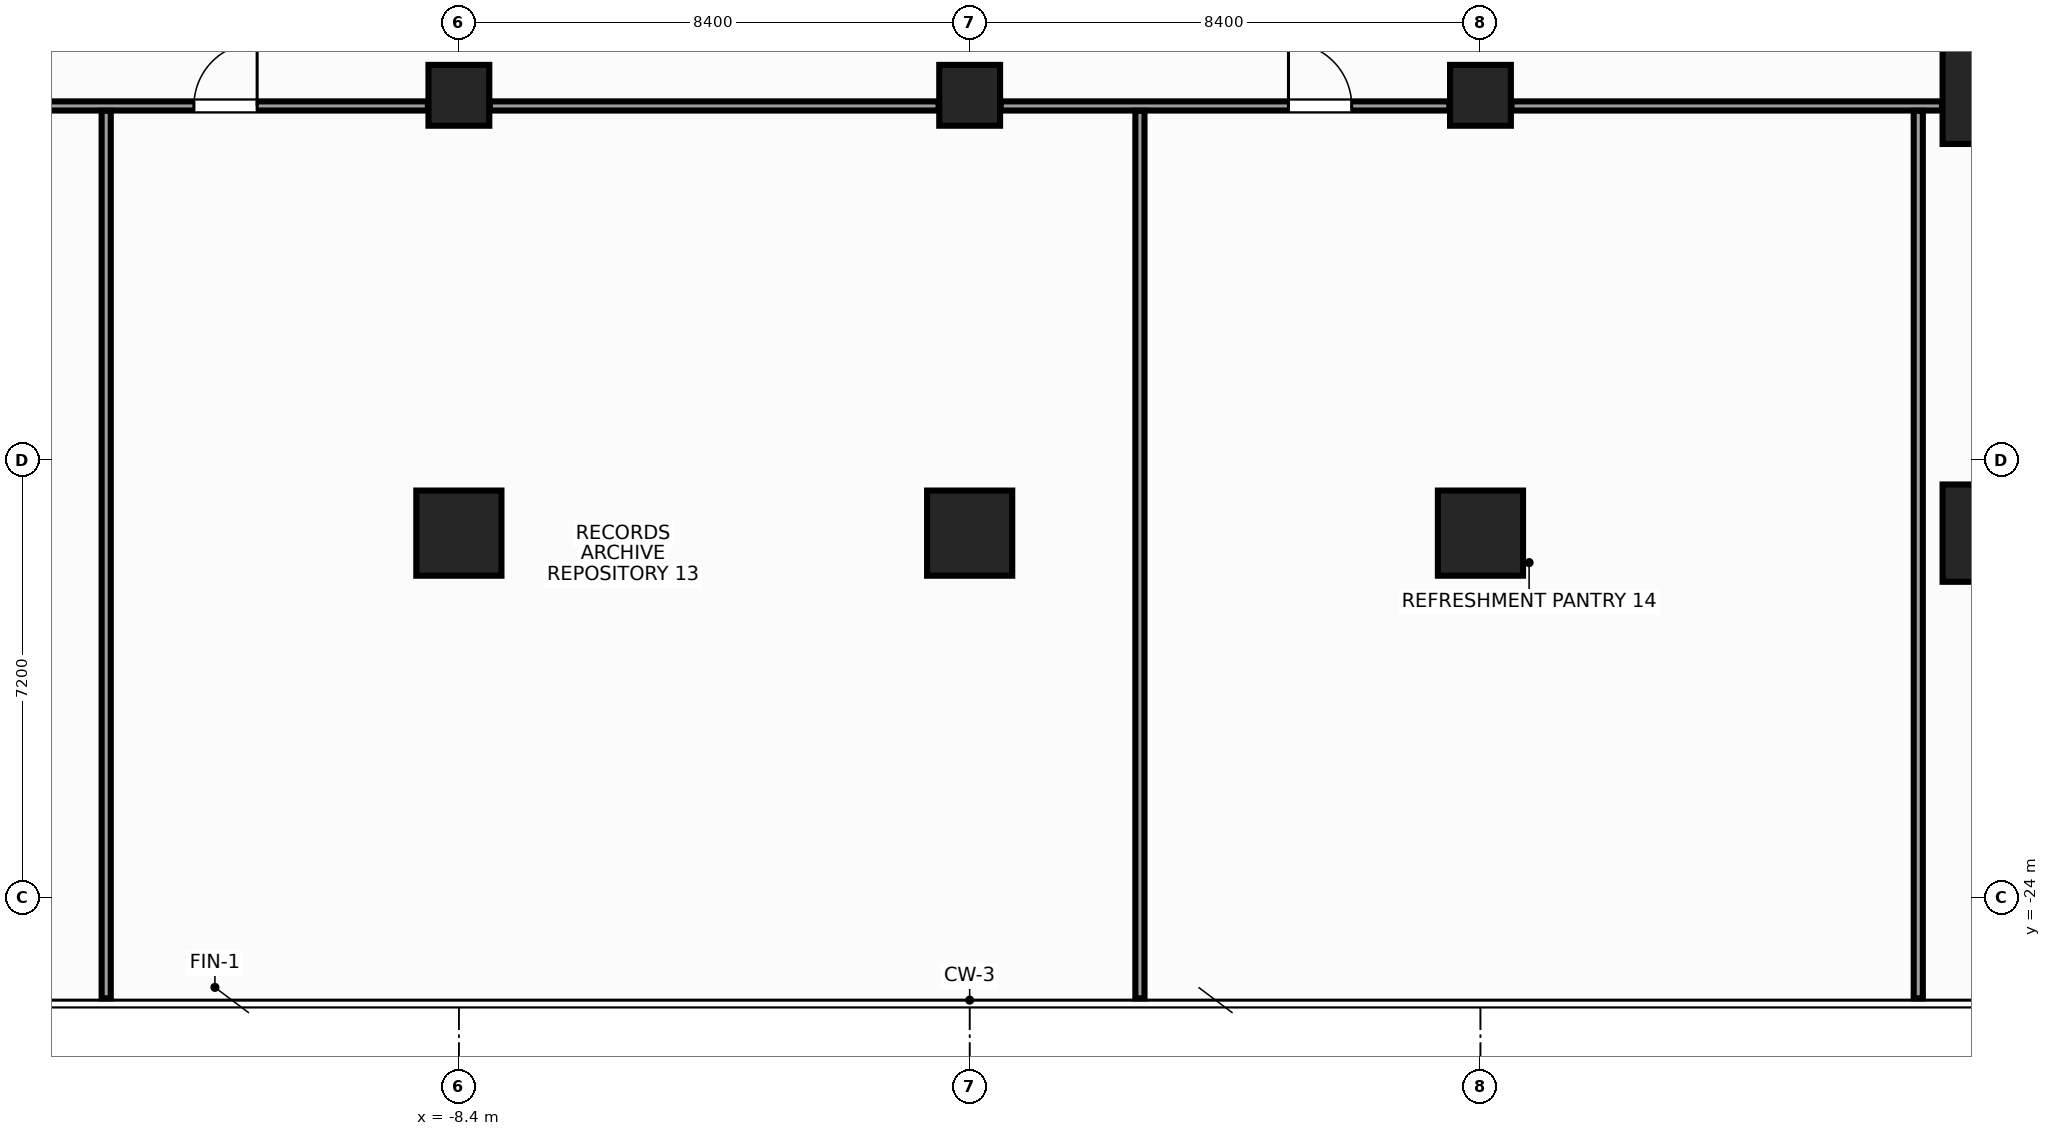
"""IFC4 building model, lengths in metres.
Left out: names, types, materials, properties, quantities, classifications, styles, units other than length and angle.
Written with IfcOpenShell. Run it as: python <this file> out.ifc"""

import sys

from ifc_helpers import new_model, si_unit, direction, frame, frame_2d, origin, origin_2d, place, context, subcontext, project, spatial, rectangle, hollow_rectangle, extrude, source, transform, mapped, element, fill, save


model = new_model("IFC4")
c1 = context("Model", 3, precision=1e-05, world=origin(), true_north=direction((0.0, 1.0)))
c2 = subcontext(c1, "Body", "Model", "MODEL_VIEW")
j1 = project(units=[si_unit("LENGTHUNIT", "METRE"), si_unit("PLANEANGLEUNIT", "RADIAN")], contexts=[c1])
p1 = place(None, origin())
s1 = spatial("IfcSite", under=j1, at=p1, CompositionType="ELEMENT")
p2 = place(p1, origin())
s2 = spatial("IfcBuilding", under=s1, at=p2, CompositionType="ELEMENT")
p3 = place(p2, frame((0.0, 0.0, 92.0)))
s3 = spatial("IfcBuildingStorey", under=s2, at=p3, CompositionType="ELEMENT", Elevation=92.0)
m1 = source(origin(), c2, "Body", "SweptSolid", [
    extrude(rectangle(XDim=1.6, YDim=1.6, at=origin_2d()), origin(), (0.0, 0.0, 1.0), 3.6),
])
for number, where, z_axis, x_axis in (
    (1, (16.8, -18.0, 0.0), (0.0, 0.0, 1.0), (1.0, 0.0, 0.0)),
    (2, (16.8, -10.8, 0.0), (0.0, 0.0, 1.0), (1.0, 0.0, 0.0)),
):
    element("IfcColumn", number, at=place(p3, frame(where, z_axis=z_axis, x_axis=x_axis)), inside=s3, PredefinedType="COLUMN", context=c2, shape_type="MappedRepresentation", body=[
        mapped(m1, transform((0.0, 0.0, 0.0), x_axis=(1.0, 0.0, 0.0), y_axis=(0.0, 1.0, 0.0), z_axis=(0.0, 0.0, 1.0), scale=1.0)),
    ])
m2 = source(origin(), c2, "Body", "SweptSolid", [
    extrude(rectangle(XDim=1.4, YDim=1.4, at=origin_2d()), origin(), (0.0, 0.0, 1.0), 3.6),
])
p4 = place(p3, frame((-8.4, -18.0, 0.0), z_axis=(0.0, 0.0, 1.0), x_axis=(1.0, 0.0, 0.0)))
e3 = element("IfcColumn", 3, at=p4, inside=s3, PredefinedType="COLUMN", context=c2, shape_type="MappedRepresentation", body=[
    mapped(m2, transform((0.0, 0.0, 0.0), x_axis=(1.0, 0.0, 0.0), y_axis=(0.0, 1.0, 0.0), z_axis=(0.0, 0.0, 1.0), scale=1.0)),
])
m3 = source(origin(), c2, "Body", "SweptSolid", [
    extrude(hollow_rectangle(XDim=1.0, YDim=1.0, WallThickness=0.045, at=origin_2d()), origin(), (0.0, 0.0, 1.0), 3.6),
])
p5 = place(p3, frame((-8.4, -10.8, 0.0), z_axis=(0.0, 0.0, 1.0), x_axis=(1.0, 0.0, 0.0)))
e4 = element("IfcColumn", 4, at=p5, inside=s3, PredefinedType="COLUMN", context=c2, shape_type="MappedRepresentation", body=[
    mapped(m3, transform((0.0, 0.0, 0.0), x_axis=(1.0, 0.0, 0.0), y_axis=(0.0, 1.0, 0.0), z_axis=(0.0, 0.0, 1.0), scale=1.0)),
])
p6 = place(p3, frame((8.4, -18.0, 0.0), z_axis=(0.0, 0.0, 1.0), x_axis=(1.0, 0.0, 0.0)))
e5 = element("IfcColumn", 5, at=p6, inside=s3, PredefinedType="COLUMN", context=c2, shape_type="MappedRepresentation", body=[
    mapped(m2, transform((0.0, 0.0, 0.0), x_axis=(1.0, 0.0, 0.0), y_axis=(0.0, 1.0, 0.0), z_axis=(0.0, 0.0, 1.0), scale=1.0)),
])
p7 = place(p3, frame((8.4, -10.8, 0.0), z_axis=(0.0, 0.0, 1.0), x_axis=(1.0, 0.0, 0.0)))
e6 = element("IfcColumn", 6, at=p7, inside=s3, PredefinedType="COLUMN", context=c2, shape_type="MappedRepresentation", body=[
    mapped(m3, transform((0.0, 0.0, 0.0), x_axis=(1.0, 0.0, 0.0), y_axis=(0.0, 1.0, 0.0), z_axis=(0.0, 0.0, 1.0), scale=1.0)),
])
p8 = place(p3, frame((0.0, -18.0, 0.0), z_axis=(0.0, 0.0, 1.0), x_axis=(1.0, 0.0, 0.0)))
e7 = element("IfcColumn", 7, at=p8, inside=s3, PredefinedType="COLUMN", context=c2, shape_type="MappedRepresentation", body=[
    mapped(m2, transform((0.0, 0.0, 0.0), x_axis=(1.0, 0.0, 0.0), y_axis=(0.0, 1.0, 0.0), z_axis=(0.0, 0.0, 1.0), scale=1.0)),
])
m4 = source(origin(), c2, "Body", "SweptSolid", [
    extrude(rectangle(XDim=1.0, YDim=1.0, at=origin_2d()), origin(), (0.0, 0.0, 1.0), 3.6),
])
p9 = place(p3, frame((0.0, -10.8, 0.0), z_axis=(0.0, 0.0, 1.0), x_axis=(1.0, 0.0, 0.0)))
e8 = element("IfcColumn", 8, at=p9, inside=s3, PredefinedType="COLUMN", context=c2, shape_type="MappedRepresentation", body=[
    mapped(m4, transform((0.0, 0.0, 0.0), x_axis=(1.0, 0.0, 0.0), y_axis=(0.0, 1.0, 0.0), z_axis=(0.0, 0.0, 1.0), scale=1.0)),
])
m5 = source(origin(), c2, "Body", "SweptSolid", [
    extrude(rectangle(XDim=7.08, YDim=0.15, at=frame_2d((3.54, 0.0))), origin(), (0.0, 0.0, 1.0), 2.745),
])
p10 = place(p3, frame((-15.99, -10.975, 0.0), z_axis=(0.0, 0.0, 1.0), x_axis=(1.0, 0.0, 0.0)))
e9 = element("IfcWall", 9, at=p10, inside=s3, PredefinedType="PARTITIONING", context=c2, shape_type="MappedRepresentation", body=[
    mapped(m5, transform((0.0, 0.0, 0.0), x_axis=(1.0, 0.0, 0.0), y_axis=(0.0, 1.0, 0.0), z_axis=(0.0, 0.0, 1.0), scale=1.0)),
])
p11 = place(p10, frame((3.232, 0.0, 0.0)))
e10 = element("IfcOpeningElement", 10, at=p11, cuts=e9, PredefinedType="OPENING", context=c2, shape_type="SweptSolid", body=[
    extrude(rectangle(XDim=1.04, YDim=2.2, at=frame_2d((0.52, 1.1))), frame((0.0, 0.087, 0.0), z_axis=(0.0, -1.0, 0.0), x_axis=(1.0, 0.0, 0.0)), (0.0, 0.0, 1.0), 0.174),
])
m6 = source(origin(), c2, "Body", "SweptSolid", [
    extrude(rectangle(XDim=7.38, YDim=0.15, at=frame_2d((3.69, 0.0))), origin(), (0.0, 0.0, 1.0), 2.745),
])
p12 = place(p3, frame((-7.89, -10.975, 0.0), z_axis=(0.0, 0.0, 1.0), x_axis=(1.0, 0.0, 0.0)))
e11 = element("IfcWall", 11, at=p12, inside=s3, PredefinedType="PARTITIONING", context=c2, shape_type="MappedRepresentation", body=[
    mapped(m6, transform((0.0, 0.0, 0.0), x_axis=(1.0, 0.0, 0.0), y_axis=(0.0, 1.0, 0.0), z_axis=(0.0, 0.0, 1.0), scale=1.0)),
])
p13 = place(p3, frame((0.51, -10.975, 0.0), z_axis=(0.0, 0.0, 1.0), x_axis=(1.0, 0.0, 0.0)))
e12 = element("IfcWall", 12, at=p13, inside=s3, PredefinedType="PARTITIONING", context=c2, shape_type="MappedRepresentation", body=[
    mapped(m6, transform((0.0, 0.0, 0.0), x_axis=(1.0, 0.0, 0.0), y_axis=(0.0, 1.0, 0.0), z_axis=(0.0, 0.0, 1.0), scale=1.0)),
])
p14 = place(p13, frame((4.732, 0.0, 0.0)))
e13 = element("IfcOpeningElement", 13, at=p14, cuts=e12, PredefinedType="OPENING", context=c2, shape_type="SweptSolid", body=[
    extrude(rectangle(XDim=1.04, YDim=2.2, at=frame_2d((0.52, 1.1))), frame((0.0, 0.087, 0.0), z_axis=(0.0, -1.0, 0.0), x_axis=(1.0, 0.0, 0.0)), (0.0, 0.0, 1.0), 0.174),
])
p15 = place(p3, frame((8.91, -10.975, 0.0), z_axis=(0.0, 0.0, 1.0), x_axis=(1.0, 0.0, 0.0)))
e14 = element("IfcWall", 14, at=p15, inside=s3, PredefinedType="PARTITIONING", context=c2, shape_type="MappedRepresentation", body=[
    mapped(m5, transform((0.0, 0.0, 0.0), x_axis=(1.0, 0.0, 0.0), y_axis=(0.0, 1.0, 0.0), z_axis=(0.0, 0.0, 1.0), scale=1.0)),
])
m7 = source(origin(), c2, "Body", "SweptSolid", [
    extrude(rectangle(XDim=14.595, YDim=0.15, at=frame_2d((7.297, 0.0))), origin(), (0.0, 0.0, 1.0), 2.745),
])
for number, where, z_axis, x_axis in (
    (15, (-14.2, -25.65, 0.0), (0.0, 0.0, 1.0), (0.0, 1.0, 0.0)),
    (16, (2.8, -25.65, 0.0), (0.0, 0.0, 1.0), (0.0, 1.0, 0.0)),
    (17, (15.6, -25.65, 0.0), (0.0, 0.0, 1.0), (0.0, 1.0, 0.0)),
):
    element("IfcWall", number, at=place(p3, frame(where, z_axis=z_axis, x_axis=x_axis)), inside=s3, PredefinedType="PARTITIONING", context=c2, shape_type="MappedRepresentation", body=[
        mapped(m7, transform((0.0, 0.0, 0.0), x_axis=(1.0, 0.0, 0.0), y_axis=(0.0, 1.0, 0.0), z_axis=(0.0, 0.0, 1.0), scale=1.0)),
    ])
m8 = source(origin(), c2, "Body", "SweptSolid", [
    extrude(rectangle(XDim=1.04, YDim=2.2, at=frame_2d((0.52, 1.1))), frame((0.0, 0.025, 0.0), z_axis=(0.0, -1.0, 0.0), x_axis=(1.0, 0.0, 0.0)), (0.0, 0.0, 1.0), 0.05),
])
p16 = place(p11, origin())
e18 = element("IfcDoor", 18, at=p16, inside=s3, OperationType="SINGLE_SWING_RIGHT", PredefinedType="DOOR", context=c2, shape_type="MappedRepresentation", body=[
    mapped(m8, transform((0.0, 0.0, 0.0), x_axis=(1.0, 0.0, 0.0), y_axis=(0.0, 1.0, 0.0), z_axis=(0.0, 0.0, 1.0), scale=1.0)),
])
fill(e10, e18)
p17 = place(p14, origin())
e19 = element("IfcDoor", 19, at=p17, inside=s3, OperationType="SINGLE_SWING_LEFT", PredefinedType="DOOR", context=c2, shape_type="MappedRepresentation", body=[
    mapped(m8, transform((0.0, 0.0, 0.0), x_axis=(1.0, 0.0, 0.0), y_axis=(0.0, 1.0, 0.0), z_axis=(0.0, 0.0, 1.0), scale=1.0)),
])
fill(e13, e19)
save(model, sys.argv[1])
